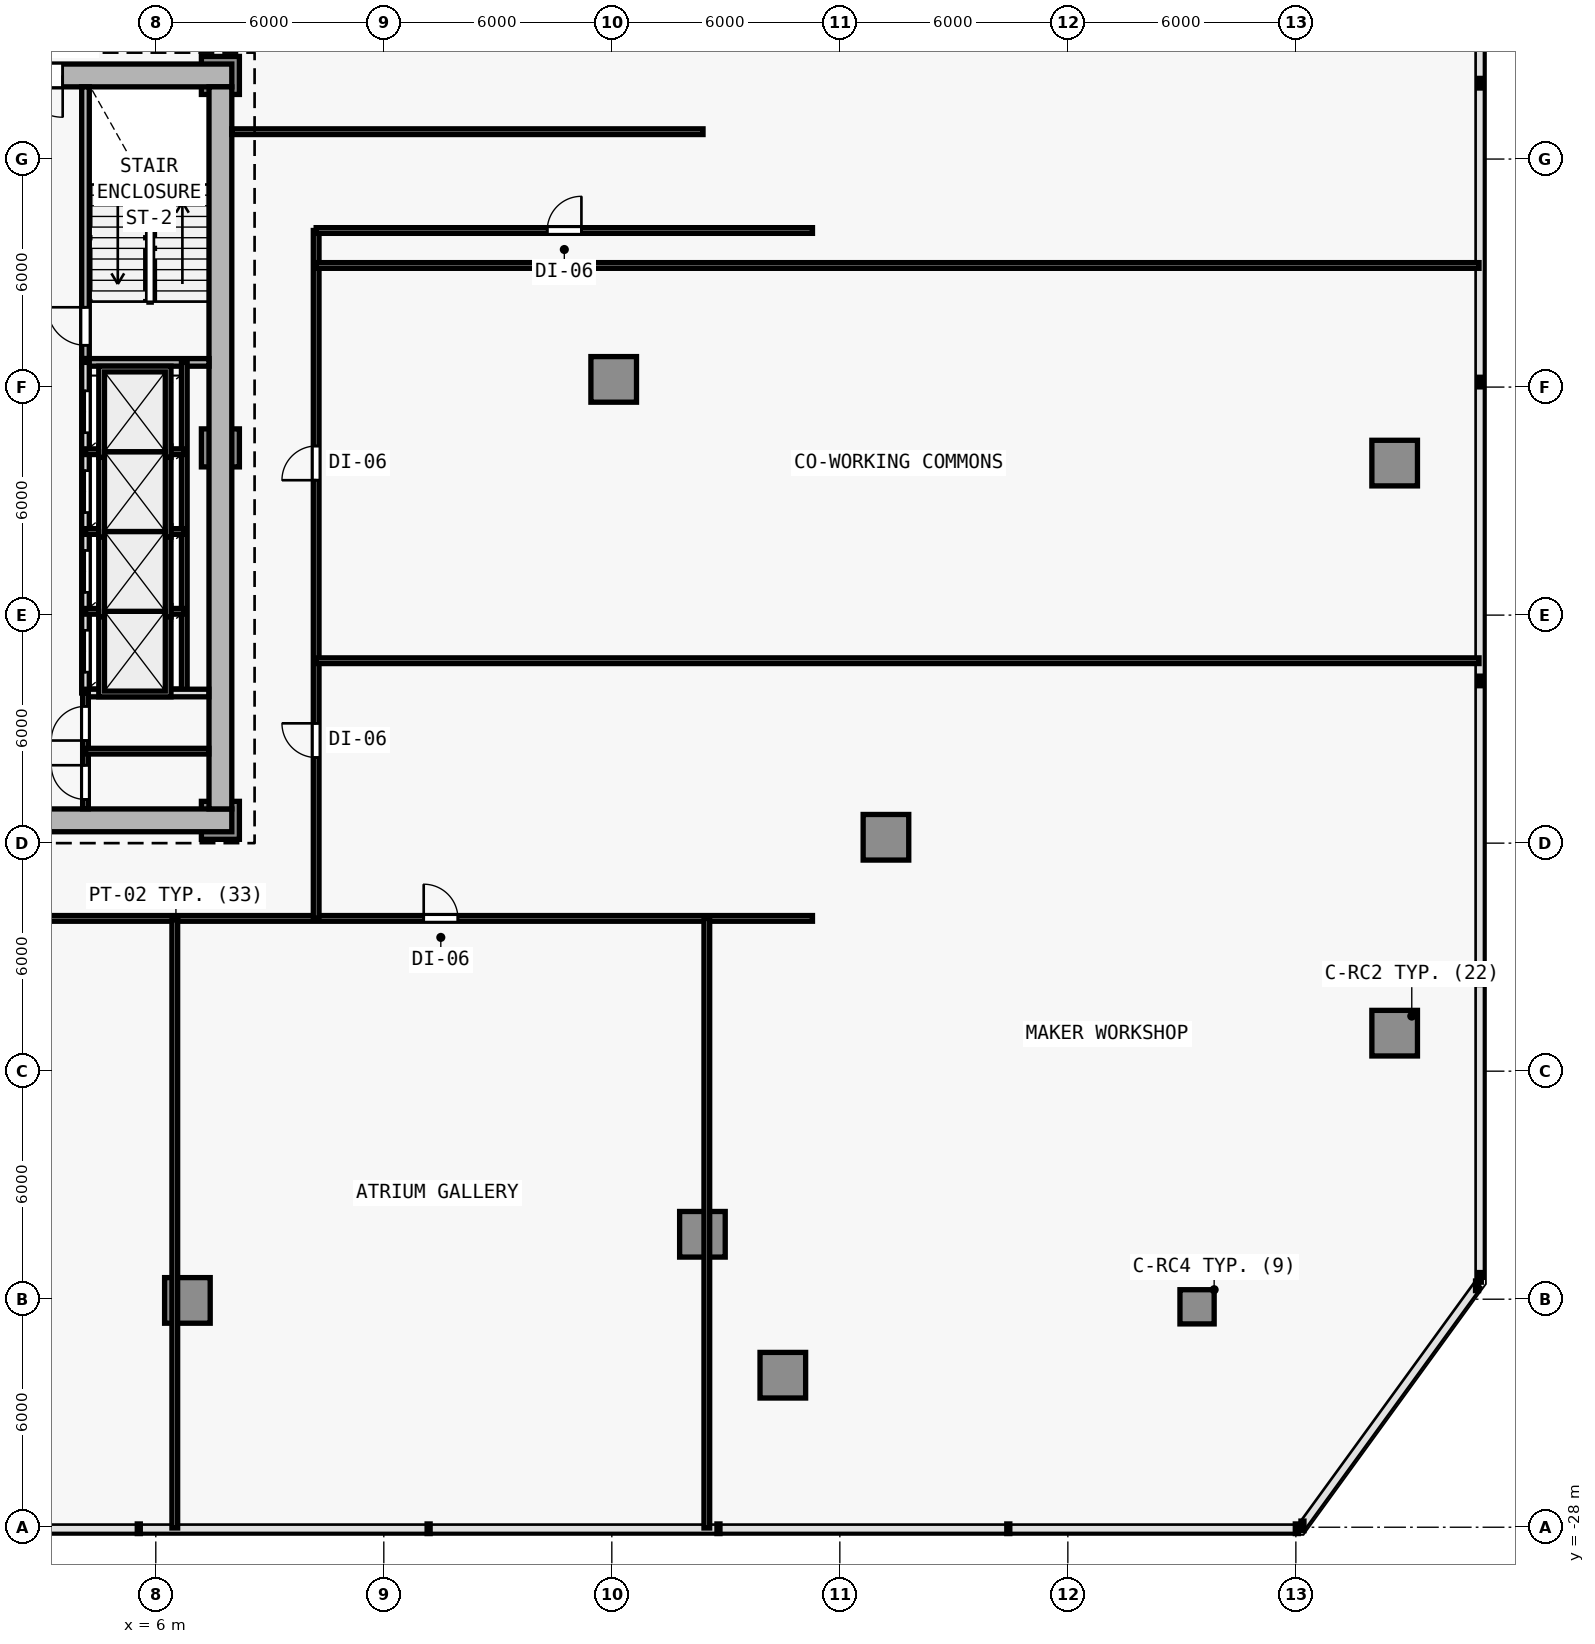
"""IFC4 building model, lengths in metres.
Left out: names, types, materials, properties, quantities, classifications, styles, units other than length and angle.
Written with IfcOpenShell. Run it as: python <this file> out.ifc"""

import sys

from ifc_helpers import new_model, si_unit, direction, frame, frame_2d, origin, origin_2d, place, context, subcontext, project, spatial, rectangle, extrude, element, fill, save


model = new_model("IFC4")
c1 = context("Model", 3, precision=1e-05, world=origin(), true_north=direction((0.0, 1.0)))
c2 = subcontext(c1, "Body", "Model", "MODEL_VIEW")
j1 = project(units=[si_unit("LENGTHUNIT", "METRE"), si_unit("PLANEANGLEUNIT", "RADIAN")], contexts=[c1])
p1 = place(None, origin())
s1 = spatial("IfcSite", under=j1, at=p1, CompositionType="ELEMENT")
p2 = place(p1, origin())
s2 = spatial("IfcBuilding", under=s1, at=p2, CompositionType="ELEMENT")
p3 = place(p2, frame((0.0, 0.0, 17.6)))
s3 = spatial("IfcBuildingStorey", under=s2, at=p3, CompositionType="ELEMENT", Elevation=17.6)
for number, where, z_axis, x_axis in (
    (1, (7.7, -9.4, 0.0), (0.0, 0.0, 1.0), (1.0, 0.0, 0.0)),
    (2, (7.7, 10.2, 0.0), (0.0, 0.0, 1.0), (1.0, 0.0, 0.0)),
    (3, (7.7, 0.4, 0.0), (0.0, 0.0, 1.0), (1.0, 0.0, 0.0)),
):
    element("IfcColumn", number, at=place(p3, frame(where, z_axis=z_axis, x_axis=x_axis)), inside=s3, PredefinedType="COLUMN", context=c2, shape_type="SweptSolid", body=[
        extrude(rectangle(XDim=1.0, YDim=1.0, at=origin_2d()), origin(), (0.0, 0.0, 1.0), 4.2),
    ])
for number, where, z_axis, x_axis in (
    (4, (38.6, -15.0, 0.0), (0.0, 0.0, 1.0), (1.0, 0.0, 0.0)),
    (5, (38.6, 0.0, 0.0), (0.0, 0.0, 1.0), (1.0, 0.0, 0.0)),
    (6, (22.5, -24.0, 0.0), (0.0, 0.0, 1.0), (1.0, 0.0, 0.0)),
    (7, (6.832, -22.032, 0.0), (0.0, 0.0, 1.0), (1.0, 0.0, 0.0)),
    (8, (20.384, -20.292, 0.0), (0.0, 0.0, 1.0), (1.0, 0.0, 0.0)),
    (9, (25.213, -9.845, 0.0), (0.0, 0.0, 1.0), (1.0, 0.0, 0.0)),
    (10, (18.05, 2.202, 0.0), (0.0, 0.0, 1.0), (1.0, 0.0, 0.0)),
):
    element("IfcColumn", number, at=place(p3, frame(where, z_axis=z_axis, x_axis=x_axis)), inside=s3, PredefinedType="COLUMN", context=c2, shape_type="SweptSolid", body=[
        extrude(rectangle(XDim=1.2, YDim=1.2, at=origin_2d()), origin(), (0.0, 0.0, 1.0), 4.2),
    ])
p4 = place(p3, frame((33.4, -22.2, 0.0), z_axis=(0.0, 0.0, 1.0), x_axis=(1.0, 0.0, 0.0)))
e11 = element("IfcColumn", 11, at=p4, inside=s3, PredefinedType="COLUMN", context=c2, shape_type="SweptSolid", body=[
    extrude(rectangle(XDim=0.9, YDim=0.9, at=origin_2d()), origin(), (0.0, 0.0, 1.0), 4.2),
])
p5 = place(p3, frame((-8.0, -9.4, 0.0), z_axis=(0.0, 0.0, 1.0), x_axis=(1.0, 0.0, 0.0)))
e12 = element("IfcWall", 12, at=p5, inside=s3, PredefinedType="SHEAR", context=c2, shape_type="SweptSolid", body=[
    extrude(rectangle(XDim=16.0, YDim=0.6, at=frame_2d((8.0, 0.0))), origin(), (0.0, 0.0, 1.0), 3.88),
])
p6 = place(p5, frame((9.65, 0.0, 0.0)))
e13 = element("IfcOpeningElement", 13, at=p6, cuts=e12, PredefinedType="OPENING", context=c2, shape_type="SweptSolid", body=[
    extrude(rectangle(XDim=1.5, YDim=2.2, at=frame_2d((0.75, 1.1))), frame((0.0, 0.31, 0.0), z_axis=(0.0, -1.0, 0.0), x_axis=(1.0, 0.0, 0.0)), (0.0, 0.0, 1.0), 0.62),
])
p7 = place(p3, frame((8.0, 10.2, 0.0), z_axis=(0.0, 0.0, 1.0), x_axis=(-1.0, 0.0, 0.0)))
e14 = element("IfcWall", 14, at=p7, inside=s3, PredefinedType="SHEAR", context=c2, shape_type="SweptSolid", body=[
    extrude(rectangle(XDim=16.0, YDim=0.6, at=frame_2d((8.0, 0.0))), origin(), (0.0, 0.0, 1.0), 3.88),
])
p8 = place(p7, frame((4.45, 0.0, 0.0)))
e15 = element("IfcOpeningElement", 15, at=p8, cuts=e14, PredefinedType="OPENING", context=c2, shape_type="SweptSolid", body=[
    extrude(rectangle(XDim=1.1, YDim=2.15, at=frame_2d((0.55, 1.075))), frame((0.0, 0.31, 0.0), z_axis=(0.0, -1.0, 0.0), x_axis=(1.0, 0.0, 0.0)), (0.0, 0.0, 1.0), 0.62),
])
p9 = place(p3, frame((7.7, 9.9, 0.0), z_axis=(0.0, 0.0, 1.0), x_axis=(0.0, -1.0, 0.0)))
e16 = element("IfcWall", 16, at=p9, inside=s3, PredefinedType="SHEAR", context=c2, shape_type="SweptSolid", body=[
    extrude(rectangle(XDim=19.0, YDim=0.6, at=frame_2d((9.5, 0.0))), origin(), (0.0, 0.0, 1.0), 3.88),
])
p10 = place(p3, frame((4.15, 2.75, 0.0), z_axis=(0.0, 0.0, 1.0), x_axis=(0.0, 1.0, 0.0)))
e17 = element("IfcWall", 17, at=p10, inside=s3, PredefinedType="SOLIDWALL", context=c2, shape_type="SweptSolid", body=[
    extrude(rectangle(XDim=7.15, YDim=0.2, at=frame_2d((3.575, 0.0))), origin(), (0.0, 0.0, 1.0), 3.88),
])
p11 = place(p10, frame((0.35, 0.0, 0.0)))
e18 = element("IfcOpeningElement", 18, at=p11, cuts=e17, PredefinedType="OPENING", context=c2, shape_type="SweptSolid", body=[
    extrude(rectangle(XDim=1.0, YDim=2.15, at=frame_2d((0.5, 1.075))), frame((0.0, 0.11, 0.0), z_axis=(0.0, -1.0, 0.0), x_axis=(1.0, 0.0, 0.0)), (0.0, 0.0, 1.0), 0.22),
])
p12 = place(p3, frame((4.05, 2.65, 0.0), z_axis=(0.0, 0.0, 1.0), x_axis=(1.0, 0.0, 0.0)))
e19 = element("IfcWall", 19, at=p12, inside=s3, PredefinedType="SOLIDWALL", context=c2, shape_type="SweptSolid", body=[
    extrude(rectangle(XDim=3.35, YDim=0.2, at=frame_2d((1.675, 0.0))), origin(), (0.0, 0.0, 1.0), 3.88),
])
p13 = place(p3, frame((4.15, -6.05, 0.0), z_axis=(0.0, 0.0, 1.0), x_axis=(0.0, 1.0, 0.0)))
e20 = element("IfcWall", 20, at=p13, inside=s3, PredefinedType="SOLIDWALL", context=c2, shape_type="SweptSolid", body=[
    extrude(rectangle(XDim=8.7, YDim=0.2, at=frame_2d((4.35, 0.0))), origin(), (0.0, 0.0, 1.0), 3.88),
])
p14 = place(p13, frame((0.55, 0.0, 0.0)))
e21 = element("IfcOpeningElement", 21, at=p14, cuts=e20, PredefinedType="OPENING", context=c2, shape_type="SweptSolid", body=[
    extrude(rectangle(XDim=1.1, YDim=2.15, at=frame_2d((0.55, 1.075))), frame((0.0, 0.11, 0.0), z_axis=(0.0, -1.0, 0.0), x_axis=(1.0, 0.0, 0.0)), (0.0, 0.0, 1.0), 0.22),
])
p15 = place(p13, frame((2.65, 0.0, 0.0)))
e22 = element("IfcOpeningElement", 22, at=p15, cuts=e20, PredefinedType="OPENING", context=c2, shape_type="SweptSolid", body=[
    extrude(rectangle(XDim=1.1, YDim=2.15, at=frame_2d((0.55, 1.075))), frame((0.0, 0.11, 0.0), z_axis=(0.0, -1.0, 0.0), x_axis=(1.0, 0.0, 0.0)), (0.0, 0.0, 1.0), 0.22),
])
p16 = place(p13, frame((4.75, 0.0, 0.0)))
e23 = element("IfcOpeningElement", 23, at=p16, cuts=e20, PredefinedType="OPENING", context=c2, shape_type="SweptSolid", body=[
    extrude(rectangle(XDim=1.1, YDim=2.15, at=frame_2d((0.55, 1.075))), frame((0.0, 0.11, 0.0), z_axis=(0.0, -1.0, 0.0), x_axis=(1.0, 0.0, 0.0)), (0.0, 0.0, 1.0), 0.22),
])
p17 = place(p13, frame((6.85, 0.0, 0.0)))
e24 = element("IfcOpeningElement", 24, at=p17, cuts=e20, PredefinedType="OPENING", context=c2, shape_type="SweptSolid", body=[
    extrude(rectangle(XDim=1.1, YDim=2.15, at=frame_2d((0.55, 1.075))), frame((0.0, 0.11, 0.0), z_axis=(0.0, -1.0, 0.0), x_axis=(1.0, 0.0, 0.0)), (0.0, 0.0, 1.0), 0.22),
])
p18 = place(p3, frame((6.75, -6.05, 0.0), z_axis=(0.0, 0.0, 1.0), x_axis=(0.0, 1.0, 0.0)))
e25 = element("IfcWall", 25, at=p18, inside=s3, PredefinedType="PARTITIONING", context=c2, shape_type="SweptSolid", body=[
    extrude(rectangle(XDim=8.7, YDim=0.15, at=frame_2d((4.35, 0.0))), origin(), (0.0, 0.0, 1.0), 3.88),
])
for number, where, z_axis, x_axis in (
    (26, (4.15, -3.9, 0.0), (0.0, 0.0, 1.0), (1.0, 0.0, 0.0)),
    (27, (4.15, -1.8, 0.0), (0.0, 0.0, 1.0), (1.0, 0.0, 0.0)),
    (28, (4.15, 0.3, 0.0), (0.0, 0.0, 1.0), (1.0, 0.0, 0.0)),
):
    element("IfcWall", number, at=place(p3, frame(where, z_axis=z_axis, x_axis=x_axis)), inside=s3, PredefinedType="PARTITIONING", context=c2, shape_type="SweptSolid", body=[
        extrude(rectangle(XDim=2.6, YDim=0.15, at=frame_2d((1.3, 0.0))), origin(), (0.0, 0.0, 1.0), 3.88),
    ])
p19 = place(p3, frame((4.15, -6.05, 0.0), z_axis=(0.0, 0.0, 1.0), x_axis=(1.0, 0.0, 0.0)))
e29 = element("IfcWall", 29, at=p19, inside=s3, PredefinedType="SOLIDWALL", context=c2, shape_type="SweptSolid", body=[
    extrude(rectangle(XDim=3.245, YDim=0.2, at=frame_2d((1.623, 0.0))), origin(), (0.0, 0.0, 1.0), 3.88),
])
p20 = place(p3, frame((4.15, -9.095, 0.0), z_axis=(0.0, 0.0, 1.0), x_axis=(0.0, 1.0, 0.0)))
e30 = element("IfcWall", 30, at=p20, inside=s3, PredefinedType="PARTITIONING", context=c2, shape_type="SweptSolid", body=[
    extrude(rectangle(XDim=3.045, YDim=0.15, at=frame_2d((1.522, 0.0))), origin(), (0.0, 0.0, 1.0), 3.88),
])
p21 = place(p20, frame((0.245, 0.0, 0.0)))
e31 = element("IfcOpeningElement", 31, at=p21, cuts=e30, PredefinedType="OPENING", context=c2, shape_type="SweptSolid", body=[
    extrude(rectangle(XDim=0.9, YDim=2.1, at=frame_2d((0.45, 1.05))), frame((0.0, 0.085, 0.0), z_axis=(0.0, -1.0, 0.0), x_axis=(1.0, 0.0, 0.0)), (0.0, 0.0, 1.0), 0.17),
])
p22 = place(p20, frame((1.795, 0.0, 0.0)))
e32 = element("IfcOpeningElement", 32, at=p22, cuts=e30, PredefinedType="OPENING", context=c2, shape_type="SweptSolid", body=[
    extrude(rectangle(XDim=0.9, YDim=2.1, at=frame_2d((0.45, 1.05))), frame((0.0, 0.085, 0.0), z_axis=(0.0, -1.0, 0.0), x_axis=(1.0, 0.0, 0.0)), (0.0, 0.0, 1.0), 0.17),
])
p23 = place(p3, frame((4.15, -7.58, 0.0), z_axis=(0.0, 0.0, 1.0), x_axis=(1.0, 0.0, 0.0)))
e33 = element("IfcWall", 33, at=p23, inside=s3, PredefinedType="PARTITIONING", context=c2, shape_type="SweptSolid", body=[
    extrude(rectangle(XDim=3.245, YDim=0.15, at=frame_2d((1.623, 0.0))), origin(), (0.0, 0.0, 1.0), 3.88),
])
p24 = place(p3, frame((-10.22, -11.98, 0.0), z_axis=(0.0, 0.0, 1.0), x_axis=(1.0, 0.0, 0.0)))
e34 = element("IfcWall", 34, at=p24, inside=s3, PredefinedType="PARTITIONING", context=c2, shape_type="SweptSolid", body=[
    extrude(rectangle(XDim=33.5, YDim=0.15, at=frame_2d((16.75, 0.0))), origin(), (0.0, 0.0, 1.0), 3.155),
])
p25 = place(p24, frame((8.52, 0.0, 0.0)))
e35 = element("IfcOpeningElement", 35, at=p25, cuts=e34, PredefinedType="OPENING", context=c2, shape_type="SweptSolid", body=[
    extrude(rectangle(XDim=0.9, YDim=2.1, at=frame_2d((0.45, 1.05))), frame((0.0, 0.085, 0.0), z_axis=(0.0, -1.0, 0.0), x_axis=(1.0, 0.0, 0.0)), (0.0, 0.0, 1.0), 0.17),
])
p26 = place(p24, frame((23.27, 0.0, 0.0)))
e36 = element("IfcOpeningElement", 36, at=p26, cuts=e34, PredefinedType="OPENING", context=c2, shape_type="SweptSolid", body=[
    extrude(rectangle(XDim=0.9, YDim=2.1, at=frame_2d((0.45, 1.05))), frame((0.0, 0.085, 0.0), z_axis=(0.0, -1.0, 0.0), x_axis=(1.0, 0.0, 0.0)), (0.0, 0.0, 1.0), 0.17),
])
p27 = place(p3, frame((10.22, -11.98, 0.0), z_axis=(0.0, 0.0, 1.0), x_axis=(0.0, 1.0, 0.0)))
e37 = element("IfcWall", 37, at=p27, inside=s3, PredefinedType="PARTITIONING", context=c2, shape_type="SweptSolid", body=[
    extrude(rectangle(XDim=18.1, YDim=0.15, at=frame_2d((9.05, 0.0))), origin(), (0.0, 0.0, 1.0), 3.155),
])
p28 = place(p27, frame((4.232, 0.0, 0.0)))
e38 = element("IfcOpeningElement", 38, at=p28, cuts=e37, PredefinedType="OPENING", context=c2, shape_type="SweptSolid", body=[
    extrude(rectangle(XDim=0.9, YDim=2.1, at=frame_2d((0.45, 1.05))), frame((0.0, 0.085, 0.0), z_axis=(0.0, -1.0, 0.0), x_axis=(1.0, 0.0, 0.0)), (0.0, 0.0, 1.0), 0.17),
])
p29 = place(p27, frame((11.53, 0.0, 0.0)))
e39 = element("IfcOpeningElement", 39, at=p29, cuts=e37, PredefinedType="OPENING", context=c2, shape_type="SweptSolid", body=[
    extrude(rectangle(XDim=0.9, YDim=2.1, at=frame_2d((0.45, 1.05))), frame((0.0, 0.085, 0.0), z_axis=(0.0, -1.0, 0.0), x_axis=(1.0, 0.0, 0.0)), (0.0, 0.0, 1.0), 0.17),
])
p30 = place(p3, frame((10.22, 6.12, 0.0), z_axis=(0.0, 0.0, 1.0), x_axis=(1.0, 0.0, 0.0)))
e40 = element("IfcWall", 40, at=p30, inside=s3, PredefinedType="PARTITIONING", context=c2, shape_type="SweptSolid", body=[
    extrude(rectangle(XDim=13.06, YDim=0.15, at=frame_2d((6.53, 0.0))), origin(), (0.0, 0.0, 1.0), 3.88),
])
p31 = place(p30, frame((6.08, 0.0, 0.0)))
e41 = element("IfcOpeningElement", 41, at=p31, cuts=e40, PredefinedType="OPENING", context=c2, shape_type="SweptSolid", body=[
    extrude(rectangle(XDim=0.9, YDim=2.1, at=frame_2d((0.45, 1.05))), frame((0.0, 0.085, 0.0), z_axis=(0.0, -1.0, 0.0), x_axis=(1.0, 0.0, 0.0)), (0.0, 0.0, 1.0), 0.17),
])
p32 = place(p3, frame((8.0, 8.72, 0.0), z_axis=(0.0, 0.0, 1.0), x_axis=(1.0, 0.0, 0.0)))
e42 = element("IfcWall", 42, at=p32, inside=s3, PredefinedType="PARTITIONING", context=c2, shape_type="SweptSolid", body=[
    extrude(rectangle(XDim=12.4, YDim=0.15, at=frame_2d((6.2, 0.0))), origin(), (0.0, 0.0, 1.0), 3.88),
])
p33 = place(p3, frame((10.22, 5.2, 0.0), z_axis=(0.0, 0.0, 1.0), x_axis=(1.0, 0.0, 0.0)))
e43 = element("IfcWall", 43, at=p33, inside=s3, PredefinedType="PARTITIONING", context=c2, shape_type="SweptSolid", body=[
    extrude(rectangle(XDim=30.6, YDim=0.15, at=frame_2d((15.3, 0.0))), origin(), (0.0, 0.0, 1.0), 3.265),
])
for number, where, z_axis, x_axis in (
    (44, (6.5, -28.02, 0.0), (0.0, 0.0, 1.0), (0.0, 1.0, 0.0)),
    (45, (20.5, -28.02, 0.0), (0.0, 0.0, 1.0), (0.0, 1.0, 0.0)),
):
    element("IfcWall", number, at=place(p3, frame(where, z_axis=z_axis, x_axis=x_axis)), inside=s3, PredefinedType="PARTITIONING", context=c2, shape_type="SweptSolid", body=[
        extrude(rectangle(XDim=16.04, YDim=0.15, at=frame_2d((8.02, 0.0))), origin(), (0.0, 0.0, 1.0), 3.155),
    ])
p34 = place(p3, frame((10.22, -5.2, 0.0), z_axis=(0.0, 0.0, 1.0), x_axis=(1.0, 0.0, 0.0)))
e46 = element("IfcWall", 46, at=p34, inside=s3, PredefinedType="PARTITIONING", context=c2, shape_type="SweptSolid", body=[
    extrude(rectangle(XDim=30.6, YDim=0.15, at=frame_2d((15.3, 0.0))), origin(), (0.0, 0.0, 1.0), 3.265),
])
p35 = place(p8, origin())
e47 = element("IfcDoor", 47, at=p35, inside=s3, OperationType="SINGLE_SWING_LEFT", PredefinedType="DOOR", context=c2, shape_type="SweptSolid", body=[
    extrude(rectangle(XDim=1.1, YDim=2.15, at=frame_2d((0.55, 1.075))), frame((0.0, 0.025, 0.0), z_axis=(0.0, -1.0, 0.0), x_axis=(1.0, 0.0, 0.0)), (0.0, 0.0, 1.0), 0.05),
])
fill(e15, e47)
p36 = place(p11, origin())
e48 = element("IfcDoor", 48, at=p36, inside=s3, OperationType="SINGLE_SWING_RIGHT", PredefinedType="DOOR", context=c2, shape_type="SweptSolid", body=[
    extrude(rectangle(XDim=1.0, YDim=2.15, at=frame_2d((0.5, 1.075))), frame((0.0, 0.025, 0.0), z_axis=(0.0, -1.0, 0.0), x_axis=(1.0, 0.0, 0.0)), (0.0, 0.0, 1.0), 0.05),
])
fill(e18, e48)
p37 = place(p14, origin())
e49 = element("IfcDoor", 49, at=p37, inside=s3, OperationType="DOUBLE_DOOR_SLIDING", PredefinedType="DOOR", context=c2, shape_type="SweptSolid", body=[
    extrude(rectangle(XDim=1.1, YDim=2.15, at=frame_2d((0.55, 1.075))), frame((0.0, 0.025, 0.0), z_axis=(0.0, -1.0, 0.0), x_axis=(1.0, 0.0, 0.0)), (0.0, 0.0, 1.0), 0.05),
])
fill(e21, e49)
p38 = place(p15, origin())
e50 = element("IfcDoor", 50, at=p38, inside=s3, OperationType="DOUBLE_DOOR_SLIDING", PredefinedType="DOOR", context=c2, shape_type="SweptSolid", body=[
    extrude(rectangle(XDim=1.1, YDim=2.15, at=frame_2d((0.55, 1.075))), frame((0.0, 0.025, 0.0), z_axis=(0.0, -1.0, 0.0), x_axis=(1.0, 0.0, 0.0)), (0.0, 0.0, 1.0), 0.05),
])
fill(e22, e50)
p39 = place(p16, origin())
e51 = element("IfcDoor", 51, at=p39, inside=s3, OperationType="DOUBLE_DOOR_SLIDING", PredefinedType="DOOR", context=c2, shape_type="SweptSolid", body=[
    extrude(rectangle(XDim=1.1, YDim=2.15, at=frame_2d((0.55, 1.075))), frame((0.0, 0.025, 0.0), z_axis=(0.0, -1.0, 0.0), x_axis=(1.0, 0.0, 0.0)), (0.0, 0.0, 1.0), 0.05),
])
fill(e23, e51)
p40 = place(p17, origin())
e52 = element("IfcDoor", 52, at=p40, inside=s3, OperationType="DOUBLE_DOOR_SLIDING", PredefinedType="DOOR", context=c2, shape_type="SweptSolid", body=[
    extrude(rectangle(XDim=1.1, YDim=2.15, at=frame_2d((0.55, 1.075))), frame((0.0, 0.025, 0.0), z_axis=(0.0, -1.0, 0.0), x_axis=(1.0, 0.0, 0.0)), (0.0, 0.0, 1.0), 0.05),
])
fill(e24, e52)
p41 = place(p21, origin())
e53 = element("IfcDoor", 53, at=p41, inside=s3, OperationType="SINGLE_SWING_RIGHT", PredefinedType="DOOR", context=c2, shape_type="SweptSolid", body=[
    extrude(rectangle(XDim=0.9, YDim=2.1, at=frame_2d((0.45, 1.05))), frame((0.0, 0.025, 0.0), z_axis=(0.0, -1.0, 0.0), x_axis=(1.0, 0.0, 0.0)), (0.0, 0.0, 1.0), 0.05),
])
fill(e31, e53)
p42 = place(p22, origin())
e54 = element("IfcDoor", 54, at=p42, inside=s3, OperationType="SINGLE_SWING_LEFT", PredefinedType="DOOR", context=c2, shape_type="SweptSolid", body=[
    extrude(rectangle(XDim=0.9, YDim=2.1, at=frame_2d((0.45, 1.05))), frame((0.0, 0.025, 0.0), z_axis=(0.0, -1.0, 0.0), x_axis=(1.0, 0.0, 0.0)), (0.0, 0.0, 1.0), 0.05),
])
fill(e32, e54)
p43 = place(p26, origin())
e55 = element("IfcDoor", 55, at=p43, inside=s3, OperationType="SINGLE_SWING_LEFT", PredefinedType="DOOR", context=c2, shape_type="SweptSolid", body=[
    extrude(rectangle(XDim=0.9, YDim=2.1, at=frame_2d((0.45, 1.05))), frame((0.0, 0.025, 0.0), z_axis=(0.0, -1.0, 0.0), x_axis=(1.0, 0.0, 0.0)), (0.0, 0.0, 1.0), 0.05),
])
fill(e36, e55)
p44 = place(p28, origin())
e56 = element("IfcDoor", 56, at=p44, inside=s3, OperationType="SINGLE_SWING_RIGHT", PredefinedType="DOOR", context=c2, shape_type="SweptSolid", body=[
    extrude(rectangle(XDim=0.9, YDim=2.1, at=frame_2d((0.45, 1.05))), frame((0.0, 0.025, 0.0), z_axis=(0.0, -1.0, 0.0), x_axis=(1.0, 0.0, 0.0)), (0.0, 0.0, 1.0), 0.05),
])
fill(e38, e56)
p45 = place(p29, origin())
e57 = element("IfcDoor", 57, at=p45, inside=s3, OperationType="SINGLE_SWING_LEFT", PredefinedType="DOOR", context=c2, shape_type="SweptSolid", body=[
    extrude(rectangle(XDim=0.9, YDim=2.1, at=frame_2d((0.45, 1.05))), frame((0.0, 0.025, 0.0), z_axis=(0.0, -1.0, 0.0), x_axis=(1.0, 0.0, 0.0)), (0.0, 0.0, 1.0), 0.05),
])
fill(e39, e57)
p46 = place(p31, origin())
e58 = element("IfcDoor", 58, at=p46, inside=s3, OperationType="SINGLE_SWING_RIGHT", PredefinedType="DOOR", context=c2, shape_type="SweptSolid", body=[
    extrude(rectangle(XDim=0.9, YDim=2.1, at=frame_2d((0.45, 1.05))), frame((0.0, 0.025, 0.0), z_axis=(0.0, -1.0, 0.0), x_axis=(1.0, 0.0, 0.0)), (0.0, 0.0, 1.0), 0.05),
])
fill(e41, e58)
save(model, sys.argv[1])
